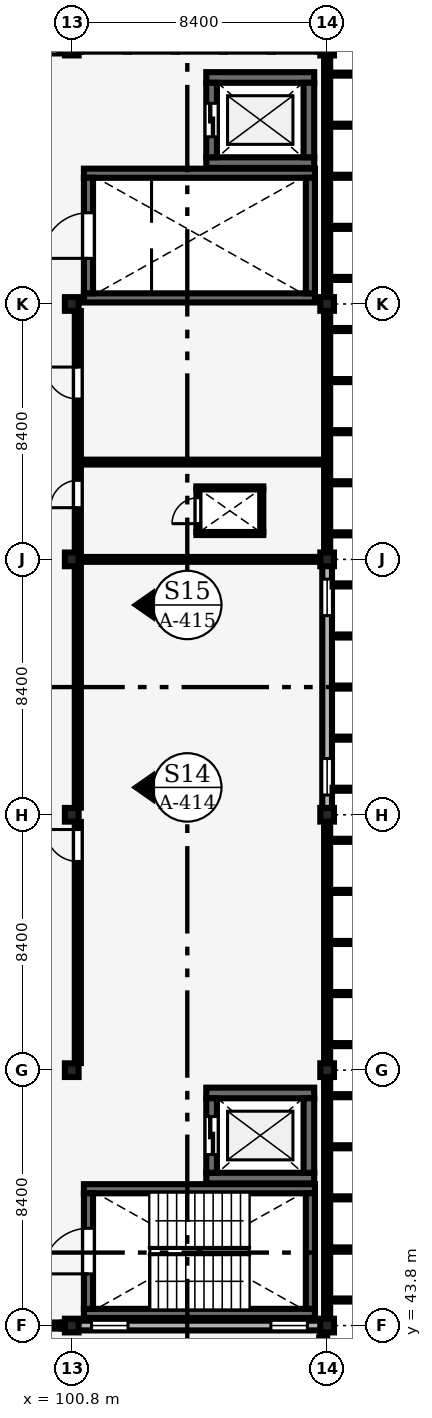
"""IFC4 building model, lengths in metres.
Left out: names, types, materials, properties, quantities, classifications, styles, units other than length and angle.
Written with IfcOpenShell. Run it as: python <this file> out.ifc"""

import sys

from ifc_helpers import new_model, si_unit, direction, frame, frame_2d, origin, origin_2d, place, context, subcontext, project, spatial, rectangle, extrude, element, fill, save


model = new_model("IFC4")
c1 = context("Model", 3, precision=1e-05, world=origin(), true_north=direction((0.0, 1.0)))
c2 = subcontext(c1, "Body", "Model", "MODEL_VIEW")
j1 = project(units=[si_unit("LENGTHUNIT", "METRE"), si_unit("PLANEANGLEUNIT", "RADIAN")], contexts=[c1])
p1 = place(None, origin())
s1 = spatial("IfcSite", under=j1, at=p1, CompositionType="ELEMENT")
p2 = place(p1, origin())
s2 = spatial("IfcBuilding", under=s1, at=p2, CompositionType="ELEMENT")
p3 = place(p2, frame((0.0, 0.0, 17.4)))
s3 = spatial("IfcBuildingStorey", under=s2, at=p3, CompositionType="ELEMENT", Elevation=17.4)
for number, where, z_axis, x_axis in (
    (1, (100.8, 43.8, 0.0), (0.0, 0.0, 1.0), (1.0, 0.0, 0.0)),
    (2, (100.8, 52.2, 0.0), (0.0, 0.0, 1.0), (1.0, 0.0, 0.0)),
    (3, (100.8, 60.6, 0.0), (0.0, 0.0, 1.0), (1.0, 0.0, 0.0)),
    (4, (100.8, 69.0, 0.0), (0.0, 0.0, 1.0), (1.0, 0.0, 0.0)),
    (5, (100.8, 77.4, 0.0), (0.0, 0.0, 1.0), (1.0, 0.0, 0.0)),
    (6, (100.8, 85.8, 0.0), (0.0, 0.0, 1.0), (1.0, 0.0, 0.0)),
    (7, (109.2, 43.8, 0.0), (0.0, 0.0, 1.0), (1.0, 0.0, 0.0)),
    (8, (109.2, 52.2, 0.0), (0.0, 0.0, 1.0), (1.0, 0.0, 0.0)),
    (9, (109.2, 60.6, 0.0), (0.0, 0.0, 1.0), (1.0, 0.0, 0.0)),
    (10, (109.2, 69.0, 0.0), (0.0, 0.0, 1.0), (1.0, 0.0, 0.0)),
    (11, (109.2, 77.4, 0.0), (0.0, 0.0, 1.0), (1.0, 0.0, 0.0)),
    (12, (109.2, 85.8, 0.0), (0.0, 0.0, 1.0), (1.0, 0.0, 0.0)),
):
    element("IfcColumn", number, at=place(p3, frame(where, z_axis=z_axis, x_axis=x_axis)), inside=s3, PredefinedType="COLUMN", context=c2, shape_type="SweptSolid", body=[
        extrude(rectangle(XDim=0.45, YDim=0.45, at=origin_2d()), origin(), (0.0, 0.0, 1.0), 4.2),
    ])
p4 = place(p3, frame((101.0, 43.8, 0.0), z_axis=(0.0, 0.0, 1.0), x_axis=(1.0, 0.0, 0.0)))
e13 = element("IfcWall", 13, at=p4, inside=s3, PredefinedType="SOLIDWALL", context=c2, shape_type="SweptSolid", body=[
    extrude(rectangle(XDim=8.0, YDim=0.32, at=frame_2d((4.0, 0.0))), origin(), (0.0, 0.0, 1.0), 3.19),
])
p5 = place(p4, frame((0.45, 0.0, 0.9)))
e14 = element("IfcOpeningElement", 14, at=p5, cuts=e13, PredefinedType="OPENING", context=c2, shape_type="SweptSolid", body=[
    extrude(rectangle(XDim=1.2, YDim=1.5, at=frame_2d((0.6, 0.75))), frame((0.0, 0.17, 0.0), z_axis=(0.0, -1.0, 0.0), x_axis=(1.0, 0.0, 0.0)), (0.0, 0.0, 1.0), 0.34),
])
p6 = place(p4, frame((6.35, 0.0, 0.9)))
e15 = element("IfcOpeningElement", 15, at=p6, cuts=e13, PredefinedType="OPENING", context=c2, shape_type="SweptSolid", body=[
    extrude(rectangle(XDim=1.2, YDim=1.8, at=frame_2d((0.6, 0.9))), frame((0.0, 0.17, 0.0), z_axis=(0.0, -1.0, 0.0), x_axis=(1.0, 0.0, 0.0)), (0.0, 0.0, 1.0), 0.34),
])
p7 = place(p3, frame((109.2, 60.8, 0.0), z_axis=(0.0, 0.0, 1.0), x_axis=(0.0, 1.0, 0.0)))
e16 = element("IfcWall", 16, at=p7, inside=s3, PredefinedType="SOLIDWALL", context=c2, shape_type="SweptSolid", body=[
    extrude(rectangle(XDim=8.0, YDim=0.32, at=frame_2d((4.0, 0.0))), origin(), (0.0, 0.0, 1.0), 3.48),
])
p8 = place(p7, frame((0.45, 0.0, 0.85)))
e17 = element("IfcOpeningElement", 17, at=p8, cuts=e16, PredefinedType="OPENING", context=c2, shape_type="SweptSolid", body=[
    extrude(rectangle(XDim=1.2, YDim=1.8, at=frame_2d((0.6, 0.9))), frame((0.0, 0.17, 0.0), z_axis=(0.0, -1.0, 0.0), x_axis=(1.0, 0.0, 0.0)), (0.0, 0.0, 1.0), 0.34),
])
p9 = place(p7, frame((6.35, 0.0, 0.85)))
e18 = element("IfcOpeningElement", 18, at=p9, cuts=e16, PredefinedType="OPENING", context=c2, shape_type="SweptSolid", body=[
    extrude(rectangle(XDim=1.2, YDim=1.8, at=frame_2d((0.6, 0.9))), frame((0.0, 0.17, 0.0), z_axis=(0.0, -1.0, 0.0), x_axis=(1.0, 0.0, 0.0)), (0.0, 0.0, 1.0), 0.34),
])
p10 = place(p3, frame((92.6, 85.8, 0.0), z_axis=(0.0, 0.0, 1.0), x_axis=(1.0, 0.0, 0.0)))
e19 = element("IfcWall", 19, at=p10, inside=s3, PredefinedType="SOLIDWALL", context=c2, shape_type="SweptSolid", body=[
    extrude(rectangle(XDim=8.0, YDim=0.32, at=frame_2d((4.0, 0.0))), origin(), (0.0, 0.0, 1.0), 3.48),
])
p11 = place(p10, frame((0.45, 0.0, 0.9)))
e20 = element("IfcOpeningElement", 20, at=p11, cuts=e19, PredefinedType="OPENING", context=c2, shape_type="SweptSolid", body=[
    extrude(rectangle(XDim=1.2, YDim=1.8, at=frame_2d((0.6, 0.9))), frame((0.0, 0.17, 0.0), z_axis=(0.0, -1.0, 0.0), x_axis=(1.0, 0.0, 0.0)), (0.0, 0.0, 1.0), 0.34),
])
p12 = place(p10, frame((6.07, 0.0, 0.9)))
e21 = element("IfcOpeningElement", 21, at=p12, cuts=e19, PredefinedType="OPENING", context=c2, shape_type="SweptSolid", body=[
    extrude(rectangle(XDim=1.68, YDim=2.4, at=frame_2d((0.84, 1.2))), frame((0.0, 0.17, 0.0), z_axis=(0.0, -1.0, 0.0), x_axis=(1.0, 0.0, 0.0)), (0.0, 0.0, 1.0), 0.34),
])
p13 = place(p3, frame((109.07, 35.79, 0.0), z_axis=(0.0, 0.0, 1.0), x_axis=(0.0, 1.0, 0.0)))
e22 = element("IfcWall", 22, at=p13, inside=s3, PredefinedType="PARAPET", context=c2, shape_type="SweptSolid", body=[
    extrude(rectangle(XDim=7.62, YDim=0.26, at=frame_2d((3.81, 0.0))), origin(), (0.0, 0.0, 1.0), 0.85),
])
for number, where, z_axis, x_axis in (
    (23, (101.2, 44.2, 0.0), (0.0, 0.0, 1.0), (1.0, 0.0, 0.0)),
    (24, (101.2, 48.3, 0.0), (0.0, 0.0, 1.0), (1.0, 0.0, 0.0)),
):
    element("IfcWall", number, at=place(p3, frame(where, z_axis=z_axis, x_axis=x_axis)), inside=s3, PredefinedType="SHEAR", context=c2, shape_type="SweptSolid", body=[
        extrude(rectangle(XDim=7.6, YDim=0.3, at=frame_2d((3.8, 0.0))), origin(), (0.0, 0.0, 1.0), 4.025),
    ])
p14 = place(p3, frame((101.35, 44.35, 0.0), z_axis=(0.0, 0.0, 1.0), x_axis=(0.0, 1.0, 0.0)))
e25 = element("IfcWall", 25, at=p14, inside=s3, PredefinedType="SHEAR", context=c2, shape_type="SweptSolid", body=[
    extrude(rectangle(XDim=3.8, YDim=0.3, at=frame_2d((1.9, 0.0))), origin(), (0.0, 0.0, 1.0), 4.025),
])
p15 = place(p14, frame((1.15, 0.0, 0.0)))
e26 = element("IfcOpeningElement", 26, at=p15, cuts=e25, PredefinedType="OPENING", context=c2, shape_type="SweptSolid", body=[
    extrude(rectangle(XDim=1.5, YDim=2.2, at=frame_2d((0.75, 1.1))), frame((0.0, 0.16, 0.0), z_axis=(0.0, -1.0, 0.0), x_axis=(1.0, 0.0, 0.0)), (0.0, 0.0, 1.0), 0.32),
])
p16 = place(p3, frame((108.65, 44.35, 0.0), z_axis=(0.0, 0.0, 1.0), x_axis=(0.0, 1.0, 0.0)))
e27 = element("IfcWall", 27, at=p16, inside=s3, PredefinedType="SHEAR", context=c2, shape_type="SweptSolid", body=[
    extrude(rectangle(XDim=3.8, YDim=0.3, at=frame_2d((1.9, 0.0))), origin(), (0.0, 0.0, 1.0), 4.025),
])
for number, where, z_axis, x_axis in (
    (28, (105.225, 48.65, 0.0), (0.0, 0.0, 1.0), (1.0, 0.0, 0.0)),
    (29, (105.225, 51.45, 0.0), (0.0, 0.0, 1.0), (1.0, 0.0, 0.0)),
):
    element("IfcWall", number, at=place(p3, frame(where, z_axis=z_axis, x_axis=x_axis)), inside=s3, PredefinedType="SHEAR", context=c2, shape_type="SweptSolid", body=[
        extrude(rectangle(XDim=3.55, YDim=0.35, at=frame_2d((1.775, 0.0))), origin(), (0.0, 0.0, 1.0), 3.92),
    ])
p17 = place(p3, frame((105.4, 48.825, 0.0), z_axis=(0.0, 0.0, 1.0), x_axis=(0.0, 1.0, 0.0)))
e30 = element("IfcWall", 30, at=p17, inside=s3, PredefinedType="SHEAR", context=c2, shape_type="SweptSolid", body=[
    extrude(rectangle(XDim=2.45, YDim=0.35, at=frame_2d((1.225, 0.0))), origin(), (0.0, 0.0, 1.0), 3.92),
])
p18 = place(p17, frame((0.6, 0.0, 0.0)))
e31 = element("IfcOpeningElement", 31, at=p18, cuts=e30, PredefinedType="OPENING", context=c2, shape_type="SweptSolid", body=[
    extrude(rectangle(XDim=1.25, YDim=2.25, at=frame_2d((0.625, 1.125))), frame((0.0, 0.185, 0.0), z_axis=(0.0, -1.0, 0.0), x_axis=(1.0, 0.0, 0.0)), (0.0, 0.0, 1.0), 0.37),
])
p19 = place(p3, frame((108.6, 48.825, 0.0), z_axis=(0.0, 0.0, 1.0), x_axis=(0.0, 1.0, 0.0)))
e32 = element("IfcWall", 32, at=p19, inside=s3, PredefinedType="SHEAR", context=c2, shape_type="SweptSolid", body=[
    extrude(rectangle(XDim=2.45, YDim=0.35, at=frame_2d((1.225, 0.0))), origin(), (0.0, 0.0, 1.0), 3.92),
])
for number, where, z_axis, x_axis in (
    (33, (101.2, 77.6, 0.0), (0.0, 0.0, 1.0), (1.0, 0.0, 0.0)),
    (34, (101.2, 81.7, 0.0), (0.0, 0.0, 1.0), (1.0, 0.0, 0.0)),
):
    element("IfcWall", number, at=place(p3, frame(where, z_axis=z_axis, x_axis=x_axis)), inside=s3, PredefinedType="SHEAR", context=c2, shape_type="SweptSolid", body=[
        extrude(rectangle(XDim=7.6, YDim=0.3, at=frame_2d((3.8, 0.0))), origin(), (0.0, 0.0, 1.0), 4.025),
    ])
p20 = place(p3, frame((101.35, 77.75, 0.0), z_axis=(0.0, 0.0, 1.0), x_axis=(0.0, 1.0, 0.0)))
e35 = element("IfcWall", 35, at=p20, inside=s3, PredefinedType="SHEAR", context=c2, shape_type="SweptSolid", body=[
    extrude(rectangle(XDim=3.8, YDim=0.3, at=frame_2d((1.9, 0.0))), origin(), (0.0, 0.0, 1.0), 4.025),
])
p21 = place(p20, frame((1.15, 0.0, 0.0)))
e36 = element("IfcOpeningElement", 36, at=p21, cuts=e35, PredefinedType="OPENING", context=c2, shape_type="SweptSolid", body=[
    extrude(rectangle(XDim=1.5, YDim=2.2, at=frame_2d((0.75, 1.1))), frame((0.0, 0.16, 0.0), z_axis=(0.0, -1.0, 0.0), x_axis=(1.0, 0.0, 0.0)), (0.0, 0.0, 1.0), 0.32),
])
p22 = place(p3, frame((108.65, 77.75, 0.0), z_axis=(0.0, 0.0, 1.0), x_axis=(0.0, 1.0, 0.0)))
e37 = element("IfcWall", 37, at=p22, inside=s3, PredefinedType="SHEAR", context=c2, shape_type="SweptSolid", body=[
    extrude(rectangle(XDim=3.8, YDim=0.3, at=frame_2d((1.9, 0.0))), origin(), (0.0, 0.0, 1.0), 4.025),
])
for number, where, z_axis, x_axis in (
    (38, (105.225, 82.05, 0.0), (0.0, 0.0, 1.0), (1.0, 0.0, 0.0)),
    (39, (105.225, 84.85, 0.0), (0.0, 0.0, 1.0), (1.0, 0.0, 0.0)),
):
    element("IfcWall", number, at=place(p3, frame(where, z_axis=z_axis, x_axis=x_axis)), inside=s3, PredefinedType="SHEAR", context=c2, shape_type="SweptSolid", body=[
        extrude(rectangle(XDim=3.55, YDim=0.35, at=frame_2d((1.775, 0.0))), origin(), (0.0, 0.0, 1.0), 3.92),
    ])
p23 = place(p3, frame((105.4, 82.225, 0.0), z_axis=(0.0, 0.0, 1.0), x_axis=(0.0, 1.0, 0.0)))
e40 = element("IfcWall", 40, at=p23, inside=s3, PredefinedType="SHEAR", context=c2, shape_type="SweptSolid", body=[
    extrude(rectangle(XDim=2.45, YDim=0.35, at=frame_2d((1.225, 0.0))), origin(), (0.0, 0.0, 1.0), 3.92),
])
p24 = place(p23, frame((0.675, 0.0, 0.0)))
e41 = element("IfcOpeningElement", 41, at=p24, cuts=e40, PredefinedType="OPENING", context=c2, shape_type="SweptSolid", body=[
    extrude(rectangle(XDim=1.1, YDim=2.2, at=frame_2d((0.55, 1.1))), frame((0.0, 0.185, 0.0), z_axis=(0.0, -1.0, 0.0), x_axis=(1.0, 0.0, 0.0)), (0.0, 0.0, 1.0), 0.37),
])
p25 = place(p3, frame((108.6, 82.225, 0.0), z_axis=(0.0, 0.0, 1.0), x_axis=(0.0, 1.0, 0.0)))
e42 = element("IfcWall", 42, at=p25, inside=s3, PredefinedType="SHEAR", context=c2, shape_type="SweptSolid", body=[
    extrude(rectangle(XDim=2.45, YDim=0.35, at=frame_2d((1.225, 0.0))), origin(), (0.0, 0.0, 1.0), 3.92),
])
for number, where, z_axis, x_axis in (
    (43, (104.9, 69.85, 0.0), (0.0, 0.0, 1.0), (1.0, 0.0, 0.0)),
    (44, (104.9, 71.35, 0.0), (0.0, 0.0, 1.0), (1.0, 0.0, 0.0)),
):
    element("IfcWall", number, at=place(p3, frame(where, z_axis=z_axis, x_axis=x_axis)), inside=s3, PredefinedType="PARTITIONING", context=c2, shape_type="SweptSolid", body=[
        extrude(rectangle(XDim=2.2, YDim=0.1, at=frame_2d((1.1, 0.0))), origin(), (0.0, 0.0, 1.0), 3.9),
    ])
p26 = place(p3, frame((104.95, 69.9, 0.0), z_axis=(0.0, 0.0, 1.0), x_axis=(0.0, 1.0, 0.0)))
e45 = element("IfcWall", 45, at=p26, inside=s3, PredefinedType="PARTITIONING", context=c2, shape_type="SweptSolid", body=[
    extrude(rectangle(XDim=1.4, YDim=0.1, at=frame_2d((0.7, 0.0))), origin(), (0.0, 0.0, 1.0), 3.9),
])
p27 = place(p26, frame((0.275, 0.0, 0.0)))
e46 = element("IfcOpeningElement", 46, at=p27, cuts=e45, PredefinedType="OPENING", context=c2, shape_type="SweptSolid", body=[
    extrude(rectangle(XDim=0.85, YDim=2.05, at=frame_2d((0.425, 1.025))), frame((0.0, 0.06, 0.0), z_axis=(0.0, -1.0, 0.0), x_axis=(1.0, 0.0, 0.0)), (0.0, 0.0, 1.0), 0.12),
])
p28 = place(p3, frame((107.05, 69.9, 0.0), z_axis=(0.0, 0.0, 1.0), x_axis=(0.0, 1.0, 0.0)))
e47 = element("IfcWall", 47, at=p28, inside=s3, PredefinedType="PARTITIONING", context=c2, shape_type="SweptSolid", body=[
    extrude(rectangle(XDim=1.4, YDim=0.1, at=frame_2d((0.7, 0.0))), origin(), (0.0, 0.0, 1.0), 3.9),
])
p29 = place(p3, frame((101.105, 69.0, 0.0), z_axis=(0.0, 0.0, 1.0), x_axis=(1.0, 0.0, 0.0)))
e48 = element("IfcWall", 48, at=p29, inside=s3, PredefinedType="PARTITIONING", context=c2, shape_type="SweptSolid", body=[
    extrude(rectangle(XDim=7.93, YDim=0.16, at=frame_2d((3.965, 0.0))), origin(), (0.0, 0.0, 1.0), 3.43),
])
p30 = place(p3, frame((101.105, 72.2, 0.0), z_axis=(0.0, 0.0, 1.0), x_axis=(1.0, 0.0, 0.0)))
e49 = element("IfcWall", 49, at=p30, inside=s3, PredefinedType="PARTITIONING", context=c2, shape_type="SweptSolid", body=[
    extrude(rectangle(XDim=7.99, YDim=0.16, at=frame_2d((3.995, 0.0))), origin(), (0.0, 0.0, 1.0), 3.9),
])
p31 = place(p3, frame((101.0, 52.435, 0.0), z_axis=(0.0, 0.0, 1.0), x_axis=(0.0, 1.0, 0.0)))
e50 = element("IfcWall", 50, at=p31, inside=s3, PredefinedType="PARTITIONING", context=c2, shape_type="SweptSolid", body=[
    extrude(rectangle(XDim=7.93, YDim=0.2, at=frame_2d((3.965, 0.0))), origin(), (0.0, 0.0, 1.0), 3.13),
])
p32 = place(p31, frame((6.63, 0.0, 0.0)))
e51 = element("IfcOpeningElement", 51, at=p32, cuts=e50, PredefinedType="OPENING", context=c2, shape_type="SweptSolid", body=[
    extrude(rectangle(XDim=1.05, YDim=2.2, at=frame_2d((0.525, 1.1))), frame((0.0, 0.11, 0.0), z_axis=(0.0, -1.0, 0.0), x_axis=(1.0, 0.0, 0.0)), (0.0, 0.0, 1.0), 0.22),
])
p33 = place(p3, frame((101.0, 60.835, 0.0), z_axis=(0.0, 0.0, 1.0), x_axis=(0.0, 1.0, 0.0)))
e52 = element("IfcWall", 52, at=p33, inside=s3, PredefinedType="PARTITIONING", context=c2, shape_type="SweptSolid", body=[
    extrude(rectangle(XDim=7.93, YDim=0.2, at=frame_2d((3.965, 0.0))), origin(), (0.0, 0.0, 1.0), 3.43),
])
p34 = place(p3, frame((101.0, 69.235, 0.0), z_axis=(0.0, 0.0, 1.0), x_axis=(0.0, 1.0, 0.0)))
e53 = element("IfcWall", 53, at=p34, inside=s3, PredefinedType="PARTITIONING", context=c2, shape_type="SweptSolid", body=[
    extrude(rectangle(XDim=7.93, YDim=0.2, at=frame_2d((3.965, 0.0))), origin(), (0.0, 0.0, 1.0), 3.48),
])
p35 = place(p34, frame((1.465, 0.0, 0.0)))
e54 = element("IfcOpeningElement", 54, at=p35, cuts=e53, PredefinedType="OPENING", context=c2, shape_type="SweptSolid", body=[
    extrude(rectangle(XDim=0.9, YDim=2.1, at=frame_2d((0.45, 1.05))), frame((0.0, 0.11, 0.0), z_axis=(0.0, -1.0, 0.0), x_axis=(1.0, 0.0, 0.0)), (0.0, 0.0, 1.0), 0.22),
])
p36 = place(p34, frame((5.04, 0.0, 0.0)))
e55 = element("IfcOpeningElement", 55, at=p36, cuts=e53, PredefinedType="OPENING", context=c2, shape_type="SweptSolid", body=[
    extrude(rectangle(XDim=1.05, YDim=2.2, at=frame_2d((0.525, 1.1))), frame((0.0, 0.11, 0.0), z_axis=(0.0, -1.0, 0.0), x_axis=(1.0, 0.0, 0.0)), (0.0, 0.0, 1.0), 0.22),
])
p37 = place(p5, origin())
e56 = element("IfcWindow", 56, at=p37, inside=s3, PartitioningType="SINGLE_PANEL", PredefinedType="WINDOW", context=c2, shape_type="SweptSolid", body=[
    extrude(rectangle(XDim=1.2, YDim=1.5, at=frame_2d((0.6, 0.75))), frame((0.0, 0.03, 0.0), z_axis=(0.0, -1.0, 0.0), x_axis=(1.0, 0.0, 0.0)), (0.0, 0.0, 1.0), 0.06),
])
fill(e14, e56)
p38 = place(p6, origin())
e57 = element("IfcWindow", 57, at=p38, inside=s3, PartitioningType="SINGLE_PANEL", PredefinedType="WINDOW", context=c2, shape_type="SweptSolid", body=[
    extrude(rectangle(XDim=1.2, YDim=1.8, at=frame_2d((0.6, 0.9))), frame((0.0, 0.03, 0.0), z_axis=(0.0, -1.0, 0.0), x_axis=(1.0, 0.0, 0.0)), (0.0, 0.0, 1.0), 0.06),
])
fill(e15, e57)
p39 = place(p8, origin())
e58 = element("IfcWindow", 58, at=p39, inside=s3, PartitioningType="SINGLE_PANEL", PredefinedType="WINDOW", context=c2, shape_type="SweptSolid", body=[
    extrude(rectangle(XDim=1.2, YDim=1.8, at=frame_2d((0.6, 0.9))), frame((0.0, 0.03, 0.0), z_axis=(0.0, -1.0, 0.0), x_axis=(1.0, 0.0, 0.0)), (0.0, 0.0, 1.0), 0.06),
])
fill(e17, e58)
p40 = place(p9, origin())
e59 = element("IfcWindow", 59, at=p40, inside=s3, PartitioningType="SINGLE_PANEL", PredefinedType="WINDOW", context=c2, shape_type="SweptSolid", body=[
    extrude(rectangle(XDim=1.2, YDim=1.8, at=frame_2d((0.6, 0.9))), frame((0.0, 0.03, 0.0), z_axis=(0.0, -1.0, 0.0), x_axis=(1.0, 0.0, 0.0)), (0.0, 0.0, 1.0), 0.06),
])
fill(e18, e59)
p41 = place(p15, origin())
e60 = element("IfcDoor", 60, at=p41, inside=s3, OperationType="DOUBLE_DOOR_SINGLE_SWING", PredefinedType="DOOR", context=c2, shape_type="SweptSolid", body=[
    extrude(rectangle(XDim=1.5, YDim=2.2, at=frame_2d((0.75, 1.1))), frame((0.0, 0.025, 0.0), z_axis=(0.0, -1.0, 0.0), x_axis=(1.0, 0.0, 0.0)), (0.0, 0.0, 1.0), 0.05),
])
fill(e26, e60)
p42 = place(p18, origin())
e61 = element("IfcDoor", 61, at=p42, inside=s3, OperationType="DOUBLE_DOOR_SLIDING", PredefinedType="DOOR", context=c2, shape_type="SweptSolid", body=[
    extrude(rectangle(XDim=1.25, YDim=2.25, at=frame_2d((0.625, 1.125))), frame((0.0, 0.025, 0.0), z_axis=(0.0, -1.0, 0.0), x_axis=(1.0, 0.0, 0.0)), (0.0, 0.0, 1.0), 0.05),
])
fill(e31, e61)
p43 = place(p21, origin())
e62 = element("IfcDoor", 62, at=p43, inside=s3, OperationType="DOUBLE_DOOR_SINGLE_SWING", PredefinedType="DOOR", context=c2, shape_type="SweptSolid", body=[
    extrude(rectangle(XDim=1.5, YDim=2.2, at=frame_2d((0.75, 1.1))), frame((0.0, 0.025, 0.0), z_axis=(0.0, -1.0, 0.0), x_axis=(1.0, 0.0, 0.0)), (0.0, 0.0, 1.0), 0.05),
])
fill(e36, e62)
p44 = place(p24, origin())
e63 = element("IfcDoor", 63, at=p44, inside=s3, OperationType="DOUBLE_DOOR_SLIDING", PredefinedType="DOOR", context=c2, shape_type="SweptSolid", body=[
    extrude(rectangle(XDim=1.1, YDim=2.2, at=frame_2d((0.55, 1.1))), frame((0.0, 0.025, 0.0), z_axis=(0.0, -1.0, 0.0), x_axis=(1.0, 0.0, 0.0)), (0.0, 0.0, 1.0), 0.05),
])
fill(e41, e63)
p45 = place(p27, origin())
e64 = element("IfcDoor", 64, at=p45, inside=s3, OperationType="SINGLE_SWING_LEFT", PredefinedType="DOOR", context=c2, shape_type="SweptSolid", body=[
    extrude(rectangle(XDim=0.85, YDim=2.05, at=frame_2d((0.425, 1.025))), frame((0.0, 0.025, 0.0), z_axis=(0.0, -1.0, 0.0), x_axis=(1.0, 0.0, 0.0)), (0.0, 0.0, 1.0), 0.05),
])
fill(e46, e64)
p46 = place(p32, origin())
e65 = element("IfcDoor", 65, at=p46, inside=s3, OperationType="SINGLE_SWING_RIGHT", PredefinedType="DOOR", context=c2, shape_type="SweptSolid", body=[
    extrude(rectangle(XDim=1.05, YDim=2.2, at=frame_2d((0.525, 1.1))), frame((0.0, 0.025, 0.0), z_axis=(0.0, -1.0, 0.0), x_axis=(1.0, 0.0, 0.0)), (0.0, 0.0, 1.0), 0.05),
])
fill(e51, e65)
p47 = place(p35, origin())
e66 = element("IfcDoor", 66, at=p47, inside=s3, OperationType="SINGLE_SWING_LEFT", PredefinedType="DOOR", context=c2, shape_type="SweptSolid", body=[
    extrude(rectangle(XDim=0.9, YDim=2.1, at=frame_2d((0.45, 1.05))), frame((0.0, 0.025, 0.0), z_axis=(0.0, -1.0, 0.0), x_axis=(1.0, 0.0, 0.0)), (0.0, 0.0, 1.0), 0.05),
])
fill(e54, e66)
p48 = place(p36, origin())
e67 = element("IfcDoor", 67, at=p48, inside=s3, OperationType="SINGLE_SWING_RIGHT", PredefinedType="DOOR", context=c2, shape_type="SweptSolid", body=[
    extrude(rectangle(XDim=1.05, YDim=2.2, at=frame_2d((0.525, 1.1))), frame((0.0, 0.025, 0.0), z_axis=(0.0, -1.0, 0.0), x_axis=(1.0, 0.0, 0.0)), (0.0, 0.0, 1.0), 0.05),
])
fill(e55, e67)
save(model, sys.argv[1])
